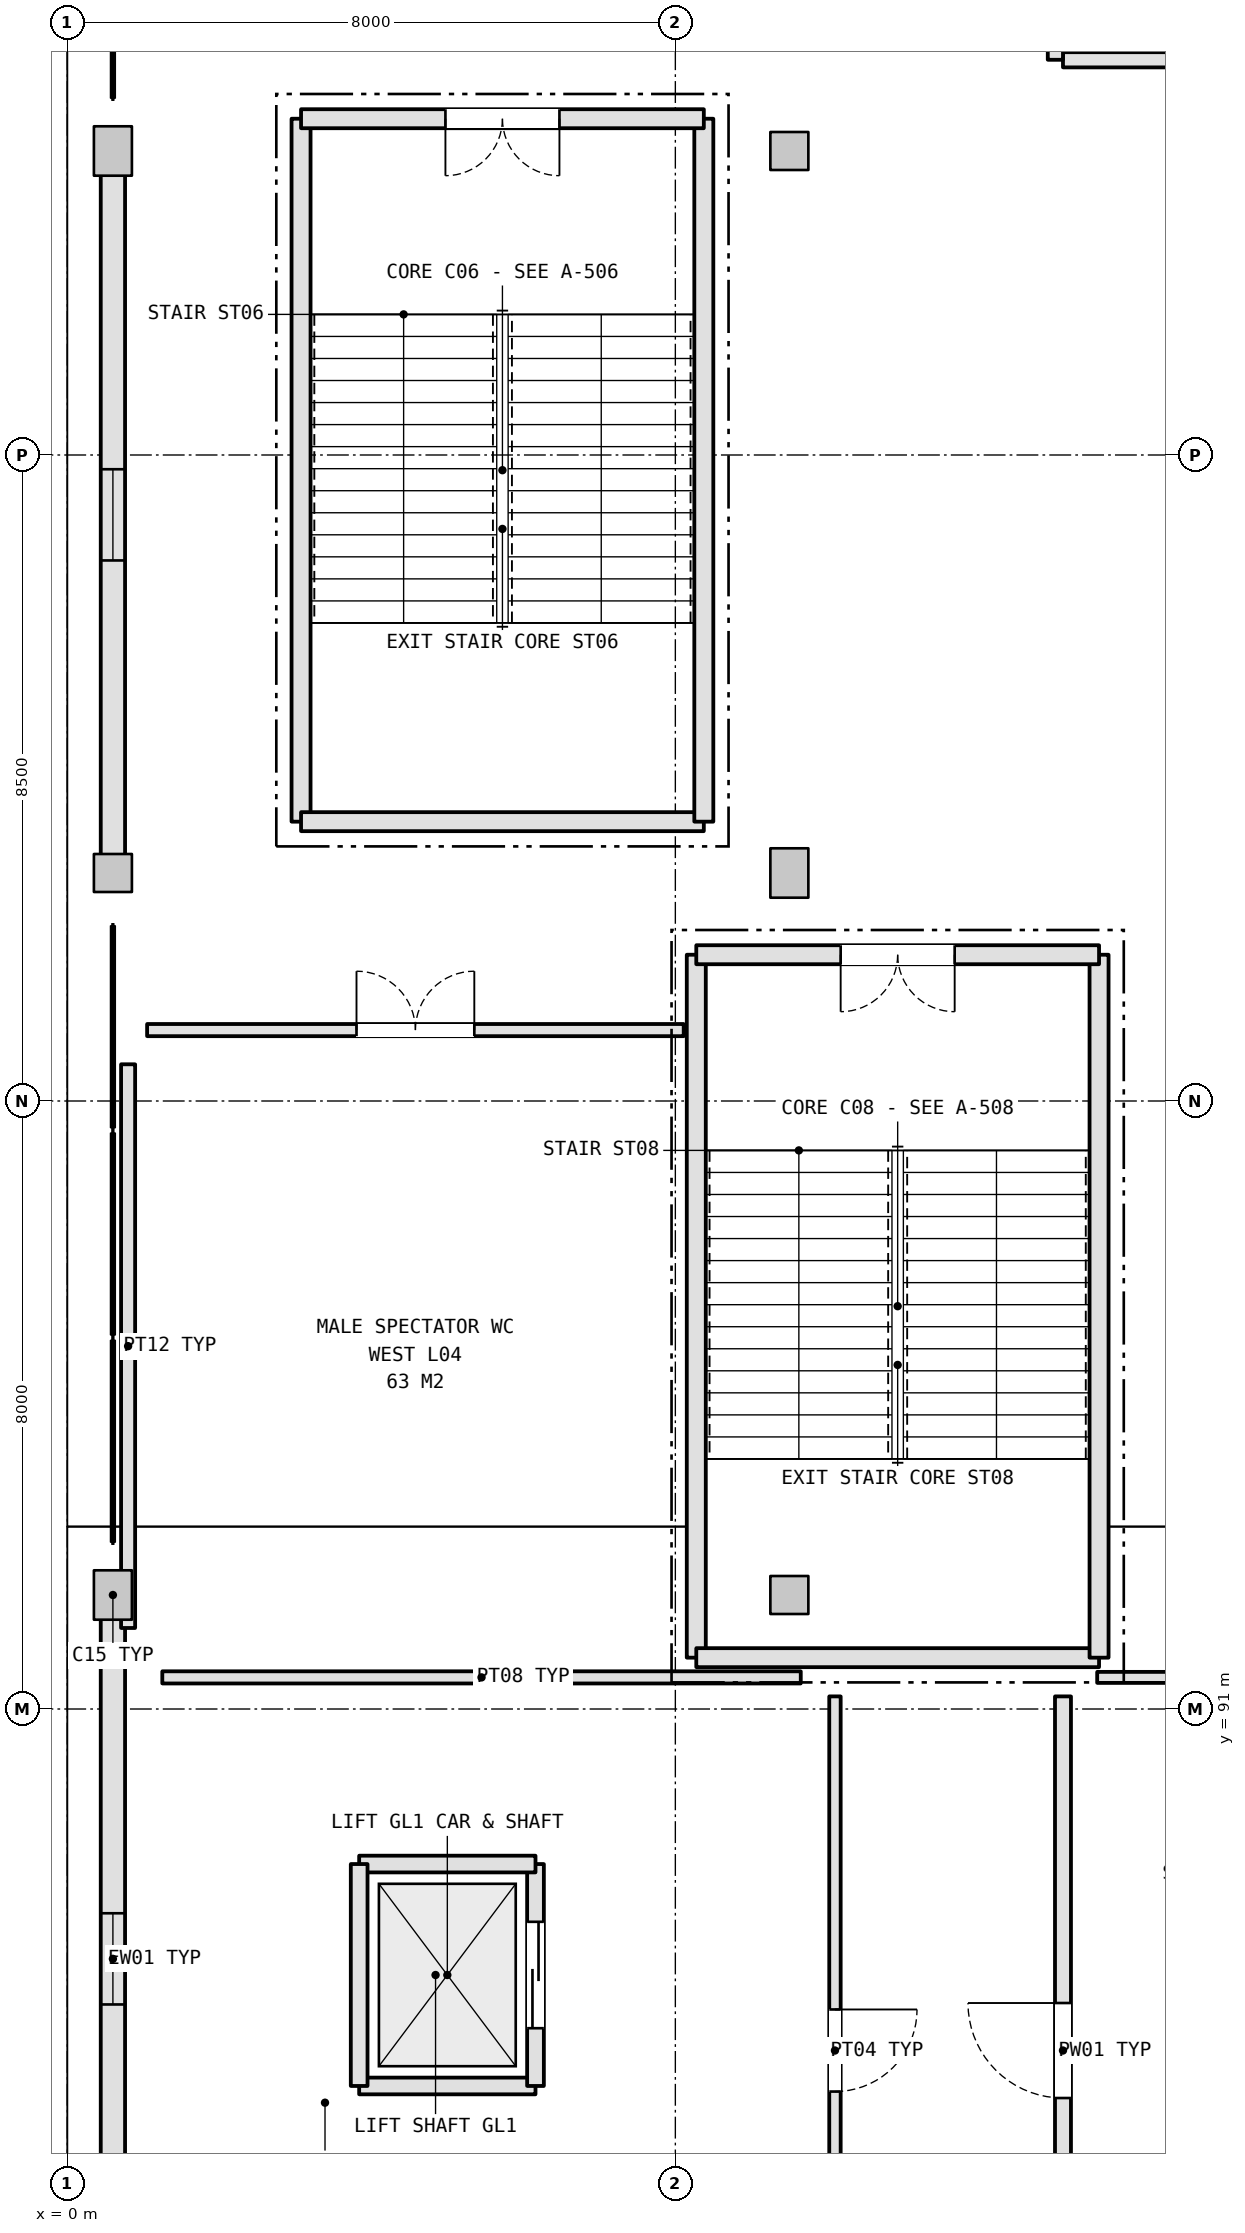
"""IFC4 building model, lengths in metres.
Left out: names, types, materials, properties, quantities, classifications, styles, units other than length and angle.
Written with IfcOpenShell. Run it as: python <this file> out.ifc"""

import sys

from ifc_helpers import new_model, si_unit, direction, frame, frame_2d, origin, origin_2d, place, context, subcontext, project, spatial, rectangle, extrude, element, fill, save


model = new_model("IFC4")
c1 = context("Model", 3, precision=1e-05, world=origin(), true_north=direction((0.0, 1.0)))
c2 = subcontext(c1, "Body", "Model", "MODEL_VIEW")
j1 = project(units=[si_unit("LENGTHUNIT", "METRE"), si_unit("PLANEANGLEUNIT", "RADIAN")], contexts=[c1])
p1 = place(None, origin())
s1 = spatial("IfcSite", under=j1, at=p1, CompositionType="ELEMENT")
p2 = place(p1, origin())
s2 = spatial("IfcBuilding", under=s1, at=p2, CompositionType="ELEMENT")
p3 = place(p2, frame((0.0, 0.0, 21.6)))
s3 = spatial("IfcBuildingStorey", under=s2, at=p3, CompositionType="ELEMENT", Elevation=21.6)
p4 = place(p3, frame((0.6, 92.5, 0.0), z_axis=(0.0, 0.0, 1.0), x_axis=(1.0, 0.0, 0.0)))
e1 = element("IfcColumn", 1, at=p4, inside=s3, PredefinedType="COLUMN", context=c2, shape_type="SweptSolid", body=[
    extrude(rectangle(XDim=0.5, YDim=0.65, at=origin_2d()), origin(), (0.0, 0.0, 1.0), 5.4),
])
p5 = place(p3, frame((0.6, 102.0, 0.0), z_axis=(0.0, 0.0, 1.0), x_axis=(1.0, 0.0, 0.0)))
e2 = element("IfcColumn", 2, at=p5, inside=s3, PredefinedType="COLUMN", context=c2, shape_type="SweptSolid", body=[
    extrude(rectangle(XDim=0.5, YDim=0.5, at=origin_2d()), origin(), (0.0, 0.0, 1.0), 5.4),
])
p6 = place(p3, frame((0.6, 111.5, 0.0), z_axis=(0.0, 0.0, 1.0), x_axis=(1.0, 0.0, 0.0)))
e3 = element("IfcColumn", 3, at=p6, inside=s3, PredefinedType="COLUMN", context=c2, shape_type="SweptSolid", body=[
    extrude(rectangle(XDim=0.5, YDim=0.65, at=origin_2d()), origin(), (0.0, 0.0, 1.0), 5.4),
])
p7 = place(p3, frame((9.5, 92.5, 0.0), z_axis=(0.0, 0.0, 1.0), x_axis=(1.0, 0.0, 0.0)))
e4 = element("IfcColumn", 4, at=p7, inside=s3, PredefinedType="COLUMN", context=c2, shape_type="SweptSolid", body=[
    extrude(rectangle(XDim=0.5, YDim=0.5, at=origin_2d()), origin(), (0.0, 0.0, 1.0), 5.4),
])
p8 = place(p3, frame((9.5, 102.0, 0.0), z_axis=(0.0, 0.0, 1.0), x_axis=(1.0, 0.0, 0.0)))
e5 = element("IfcColumn", 5, at=p8, inside=s3, PredefinedType="COLUMN", context=c2, shape_type="SweptSolid", body=[
    extrude(rectangle(XDim=0.5, YDim=0.65, at=origin_2d()), origin(), (0.0, 0.0, 1.0), 5.4),
])
p9 = place(p3, frame((9.5, 111.5, 0.0), z_axis=(0.0, 0.0, 1.0), x_axis=(1.0, 0.0, 0.0)))
e6 = element("IfcColumn", 6, at=p9, inside=s3, PredefinedType="COLUMN", context=c2, shape_type="SweptSolid", body=[
    extrude(rectangle(XDim=0.5, YDim=0.5, at=origin_2d()), origin(), (0.0, 0.0, 1.0), 5.4),
])
p10 = place(p3, frame((0.6, 83.238, 0.0), z_axis=(0.0, 0.0, 1.0), x_axis=(0.0, 1.0, 0.0)))
e7 = element("IfcWall", 7, at=p10, inside=s3, PredefinedType="SOLIDWALL", context=c2, shape_type="SweptSolid", body=[
    extrude(rectangle(XDim=8.949, YDim=0.32, at=frame_2d((4.475, 0.0))), origin(), (0.0, 0.0, 1.0), 4.485),
])
p11 = place(p10, frame((3.875, 0.0, 1.05)))
e8 = element("IfcOpeningElement", 8, at=p11, cuts=e7, PredefinedType="OPENING", context=c2, shape_type="SweptSolid", body=[
    extrude(rectangle(XDim=1.2, YDim=2.0, at=frame_2d((0.6, 1.0))), frame((0.0, 0.17, 0.0), z_axis=(0.0, -1.0, 0.0), x_axis=(1.0, 0.0, 0.0)), (0.0, 0.0, 1.0), 0.34),
])
p12 = place(p3, frame((0.6, 102.238, 0.0), z_axis=(0.0, 0.0, 1.0), x_axis=(0.0, 1.0, 0.0)))
e9 = element("IfcWall", 9, at=p12, inside=s3, PredefinedType="SOLIDWALL", context=c2, shape_type="SweptSolid", body=[
    extrude(rectangle(XDim=8.949, YDim=0.32, at=frame_2d((4.475, 0.0))), origin(), (0.0, 0.0, 1.0), 4.465),
])
p13 = place(p12, frame((3.875, 0.0, 1.05)))
e10 = element("IfcOpeningElement", 10, at=p13, cuts=e9, PredefinedType="OPENING", context=c2, shape_type="SweptSolid", body=[
    extrude(rectangle(XDim=1.2, YDim=2.0, at=frame_2d((0.6, 1.0))), frame((0.0, 0.17, 0.0), z_axis=(0.0, -1.0, 0.0), x_axis=(1.0, 0.0, 0.0)), (0.0, 0.0, 1.0), 0.34),
])
p14 = place(p3, frame((3.075, 111.925, 0.0), z_axis=(0.0, 0.0, 1.0), x_axis=(0.0, -1.0, 0.0)))
e11 = element("IfcWall", 11, at=p14, inside=s3, PredefinedType="SHEAR", context=c2, shape_type="SweptSolid", body=[
    extrude(rectangle(XDim=9.249, YDim=0.25, at=frame_2d((4.625, 0.0))), origin(), (0.0, 0.0, 1.0), 5.15),
])
p15 = place(p3, frame((3.075, 102.675, 0.0), z_axis=(0.0, 0.0, 1.0), x_axis=(1.0, 0.0, 0.0)))
e12 = element("IfcWall", 12, at=p15, inside=s3, PredefinedType="SHEAR", context=c2, shape_type="SweptSolid", body=[
    extrude(rectangle(XDim=5.299, YDim=0.25, at=frame_2d((2.649, 0.0))), origin(), (0.0, 0.0, 1.0), 5.15),
])
p16 = place(p3, frame((8.375, 102.675, 0.0), z_axis=(0.0, 0.0, 1.0), x_axis=(0.0, 1.0, 0.0)))
e13 = element("IfcWall", 13, at=p16, inside=s3, PredefinedType="SHEAR", context=c2, shape_type="SweptSolid", body=[
    extrude(rectangle(XDim=9.249, YDim=0.25, at=frame_2d((4.625, 0.0))), origin(), (0.0, 0.0, 1.0), 5.15),
])
p17 = place(p3, frame((8.375, 111.925, 0.0), z_axis=(0.0, 0.0, 1.0), x_axis=(-1.0, 0.0, 0.0)))
e14 = element("IfcWall", 14, at=p17, inside=s3, PredefinedType="SHEAR", context=c2, shape_type="SweptSolid", body=[
    extrude(rectangle(XDim=5.299, YDim=0.25, at=frame_2d((2.649, 0.0))), origin(), (0.0, 0.0, 1.0), 5.15),
])
p18 = place(p17, frame((1.9, 0.0, 0.0)))
e15 = element("IfcOpeningElement", 15, at=p18, cuts=e14, PredefinedType="OPENING", context=c2, shape_type="SweptSolid", body=[
    extrude(rectangle(XDim=1.5, YDim=2.2, at=frame_2d((0.75, 1.1))), frame((0.0, 0.135, 0.0), z_axis=(0.0, -1.0, 0.0), x_axis=(1.0, 0.0, 0.0)), (0.0, 0.0, 1.0), 0.27),
])
p19 = place(p3, frame((8.275, 100.925, 0.0), z_axis=(0.0, 0.0, 1.0), x_axis=(0.0, -1.0, 0.0)))
e16 = element("IfcWall", 16, at=p19, inside=s3, PredefinedType="SHEAR", context=c2, shape_type="SweptSolid", body=[
    extrude(rectangle(XDim=9.249, YDim=0.25, at=frame_2d((4.625, 0.0))), origin(), (0.0, 0.0, 1.0), 5.15),
])
p20 = place(p3, frame((8.275, 91.675, 0.0), z_axis=(0.0, 0.0, 1.0), x_axis=(1.0, 0.0, 0.0)))
e17 = element("IfcWall", 17, at=p20, inside=s3, PredefinedType="SHEAR", context=c2, shape_type="SweptSolid", body=[
    extrude(rectangle(XDim=5.299, YDim=0.25, at=frame_2d((2.65, 0.0))), origin(), (0.0, 0.0, 1.0), 5.15),
])
p21 = place(p3, frame((13.575, 91.675, 0.0), z_axis=(0.0, 0.0, 1.0), x_axis=(0.0, 1.0, 0.0)))
e18 = element("IfcWall", 18, at=p21, inside=s3, PredefinedType="SHEAR", context=c2, shape_type="SweptSolid", body=[
    extrude(rectangle(XDim=9.249, YDim=0.25, at=frame_2d((4.625, 0.0))), origin(), (0.0, 0.0, 1.0), 5.15),
])
p22 = place(p3, frame((13.575, 100.925, 0.0), z_axis=(0.0, 0.0, 1.0), x_axis=(-1.0, 0.0, 0.0)))
e19 = element("IfcWall", 19, at=p22, inside=s3, PredefinedType="SHEAR", context=c2, shape_type="SweptSolid", body=[
    extrude(rectangle(XDim=5.299, YDim=0.25, at=frame_2d((2.65, 0.0))), origin(), (0.0, 0.0, 1.0), 5.15),
])
p23 = place(p22, frame((1.9, 0.0, 0.0)))
e20 = element("IfcOpeningElement", 20, at=p23, cuts=e19, PredefinedType="OPENING", context=c2, shape_type="SweptSolid", body=[
    extrude(rectangle(XDim=1.5, YDim=2.2, at=frame_2d((0.75, 1.1))), frame((0.0, 0.135, 0.0), z_axis=(0.0, -1.0, 0.0), x_axis=(1.0, 0.0, 0.0)), (0.0, 0.0, 1.0), 0.27),
])
p24 = place(p3, frame((13.1, 112.7, 0.0), z_axis=(0.0, 0.0, 1.0), x_axis=(1.0, 0.0, 0.0)))
e21 = element("IfcWall", 21, at=p24, inside=s3, PredefinedType="SOLIDWALL", context=c2, shape_type="SweptSolid", body=[
    extrude(rectangle(XDim=3.4, YDim=0.2, at=frame_2d((1.7, 0.0))), origin(), (0.0, 0.0, 1.0), 5.12),
])
p25 = place(p3, frame((13.0, 119.3, 0.0), z_axis=(0.0, 0.0, 1.0), x_axis=(0.0, -1.0, 0.0)))
e22 = element("IfcWall", 22, at=p25, inside=s3, PredefinedType="SOLIDWALL", context=c2, shape_type="SweptSolid", body=[
    extrude(rectangle(XDim=6.6, YDim=0.2, at=frame_2d((3.3, 0.0))), origin(), (0.0, 0.0, 1.0), 5.12),
])
p26 = place(p25, frame((2.7, 0.0, 0.0)))
e23 = element("IfcOpeningElement", 23, at=p26, cuts=e22, PredefinedType="OPENING", context=c2, shape_type="SweptSolid", body=[
    extrude(rectangle(XDim=1.2, YDim=2.2, at=frame_2d((0.6, 1.1))), frame((0.0, 0.11, 0.0), z_axis=(0.0, -1.0, 0.0), x_axis=(1.0, 0.0, 0.0)), (0.0, 0.0, 1.0), 0.22),
])
p27 = place(p3, frame((3.84, 86.04, 0.0), z_axis=(0.0, 0.0, 1.0), x_axis=(1.0, 0.0, 0.0)))
e24 = element("IfcWall", 24, at=p27, inside=s3, PredefinedType="SHEAR", context=c2, shape_type="SweptSolid", body=[
    extrude(rectangle(XDim=2.32, YDim=0.22, at=frame_2d((1.16, 0.0))), origin(), (0.0, 0.0, 1.0), 5.15),
])
p28 = place(p3, frame((6.16, 86.04, 0.0), z_axis=(0.0, 0.0, 1.0), x_axis=(0.0, 1.0, 0.0)))
e25 = element("IfcWall", 25, at=p28, inside=s3, PredefinedType="SHEAR", context=c2, shape_type="SweptSolid", body=[
    extrude(rectangle(XDim=2.92, YDim=0.22, at=frame_2d((1.46, 0.0))), origin(), (0.0, 0.0, 1.0), 5.15),
])
p29 = place(p28, frame((0.76, 0.0, 0.0)))
e26 = element("IfcOpeningElement", 26, at=p29, cuts=e25, PredefinedType="OPENING", context=c2, shape_type="SweptSolid", body=[
    extrude(rectangle(XDim=1.4, YDim=2.3, at=frame_2d((0.7, 1.15))), frame((0.0, 0.12, 0.0), z_axis=(0.0, -1.0, 0.0), x_axis=(1.0, 0.0, 0.0)), (0.0, 0.0, 1.0), 0.24),
])
p30 = place(p3, frame((6.16, 88.96, 0.0), z_axis=(0.0, 0.0, 1.0), x_axis=(-1.0, 0.0, 0.0)))
e27 = element("IfcWall", 27, at=p30, inside=s3, PredefinedType="SHEAR", context=c2, shape_type="SweptSolid", body=[
    extrude(rectangle(XDim=2.32, YDim=0.22, at=frame_2d((1.16, 0.0))), origin(), (0.0, 0.0, 1.0), 5.15),
])
p31 = place(p3, frame((3.84, 88.96, 0.0), z_axis=(0.0, 0.0, 1.0), x_axis=(0.0, -1.0, 0.0)))
e28 = element("IfcWall", 28, at=p31, inside=s3, PredefinedType="SHEAR", context=c2, shape_type="SweptSolid", body=[
    extrude(rectangle(XDim=2.92, YDim=0.22, at=frame_2d((1.46, 0.0))), origin(), (0.0, 0.0, 1.0), 5.15),
])
p32 = place(p3, frame((10.1, 91.166, 0.0), z_axis=(0.0, 0.0, 1.0), x_axis=(0.0, -1.0, 0.0)))
e29 = element("IfcWall", 29, at=p32, inside=s3, PredefinedType="PARTITIONING", context=c2, shape_type="SweptSolid", body=[
    extrude(rectangle(XDim=9.319, YDim=0.15, at=frame_2d((4.66, 0.0))), origin(), (0.0, 0.0, 1.0), 4.666),
])
p33 = place(p32, frame((4.119, 0.0, 0.0)))
e30 = element("IfcOpeningElement", 30, at=p33, cuts=e29, PredefinedType="OPENING", context=c2, shape_type="SweptSolid", body=[
    extrude(rectangle(XDim=1.08, YDim=2.25, at=frame_2d((0.54, 1.125))), frame((0.0, 0.085, 0.0), z_axis=(0.0, -1.0, 0.0), x_axis=(1.0, 0.0, 0.0)), (0.0, 0.0, 1.0), 0.17),
])
p34 = place(p3, frame((1.25, 91.416, 0.0), z_axis=(0.0, 0.0, 1.0), x_axis=(1.0, 0.0, 0.0)))
e31 = element("IfcWall", 31, at=p34, inside=s3, PredefinedType="PARTITIONING", context=c2, shape_type="SweptSolid", body=[
    extrude(rectangle(XDim=8.4, YDim=0.16, at=frame_2d((4.2, 0.0))), origin(), (0.0, 0.0, 1.0), 5.12),
])
p35 = place(p3, frame((13.1, 81.847, 0.0), z_axis=(0.0, 0.0, 1.0), x_axis=(0.0, 1.0, 0.0)))
e32 = element("IfcWall", 32, at=p35, inside=s3, PredefinedType="PLUMBINGWALL", context=c2, shape_type="SweptSolid", body=[
    extrude(rectangle(XDim=9.319, YDim=0.21, at=frame_2d((4.66, 0.0))), origin(), (0.0, 0.0, 1.0), 4.666),
])
p36 = place(p35, frame((4.034, 0.0, 0.0)))
e33 = element("IfcOpeningElement", 33, at=p36, cuts=e32, PredefinedType="OPENING", context=c2, shape_type="SweptSolid", body=[
    extrude(rectangle(XDim=1.25, YDim=2.2, at=frame_2d((0.625, 1.1))), frame((0.0, 0.115, 0.0), z_axis=(0.0, -1.0, 0.0), x_axis=(1.0, 0.0, 0.0)), (0.0, 0.0, 1.0), 0.23),
])
p37 = place(p3, frame((13.55, 91.416, 0.0), z_axis=(0.0, 0.0, 1.0), x_axis=(1.0, 0.0, 0.0)))
e34 = element("IfcWall", 34, at=p37, inside=s3, PredefinedType="PARTITIONING", context=c2, shape_type="SweptSolid", body=[
    extrude(rectangle(XDim=4.2, YDim=0.145, at=frame_2d((2.1, 0.0))), origin(), (0.0, 0.0, 1.0), 5.12),
])
p38 = place(p3, frame((1.05, 99.933, 0.0), z_axis=(0.0, 0.0, 1.0), x_axis=(1.0, 0.0, 0.0)))
e35 = element("IfcWall", 35, at=p38, inside=s3, PredefinedType="PARTITIONING", context=c2, shape_type="SweptSolid", body=[
    extrude(rectangle(XDim=7.06, YDim=0.16, at=frame_2d((3.53, 0.0))), origin(), (0.0, 0.0, 1.0), 5.12),
])
p39 = place(p38, frame((2.755, 0.0, 0.0)))
e36 = element("IfcOpeningElement", 36, at=p39, cuts=e35, PredefinedType="OPENING", context=c2, shape_type="SweptSolid", body=[
    extrude(rectangle(XDim=1.55, YDim=2.15, at=frame_2d((0.775, 1.075))), frame((0.0, 0.09, 0.0), z_axis=(0.0, -1.0, 0.0), x_axis=(1.0, 0.0, 0.0)), (0.0, 0.0, 1.0), 0.18),
])
p40 = place(p3, frame((0.8, 92.066, 0.0), z_axis=(0.0, 0.0, 1.0), x_axis=(0.0, 1.0, 0.0)))
e37 = element("IfcWall", 37, at=p40, inside=s3, PredefinedType="PARTITIONING", context=c2, shape_type="SweptSolid", body=[
    extrude(rectangle(XDim=7.417, YDim=0.185, at=frame_2d((3.708, 0.0))), origin(), (0.0, 0.0, 1.0), 4.485),
])
p41 = place(p11, origin())
e38 = element("IfcWindow", 38, at=p41, inside=s3, PartitioningType="SINGLE_PANEL", PredefinedType="WINDOW", context=c2, shape_type="SweptSolid", body=[
    extrude(rectangle(XDim=1.2, YDim=2.0, at=frame_2d((0.6, 1.0))), frame((0.0, 0.03, 0.0), z_axis=(0.0, -1.0, 0.0), x_axis=(1.0, 0.0, 0.0)), (0.0, 0.0, 1.0), 0.06),
])
fill(e8, e38)
p42 = place(p13, origin())
e39 = element("IfcWindow", 39, at=p42, inside=s3, PartitioningType="SINGLE_PANEL", PredefinedType="WINDOW", context=c2, shape_type="SweptSolid", body=[
    extrude(rectangle(XDim=1.2, YDim=2.0, at=frame_2d((0.6, 1.0))), frame((0.0, 0.03, 0.0), z_axis=(0.0, -1.0, 0.0), x_axis=(1.0, 0.0, 0.0)), (0.0, 0.0, 1.0), 0.06),
])
fill(e10, e39)
p43 = place(p18, origin())
e40 = element("IfcDoor", 40, at=p43, inside=s3, OperationType="DOUBLE_DOOR_SINGLE_SWING", PredefinedType="DOOR", context=c2, shape_type="SweptSolid", body=[
    extrude(rectangle(XDim=1.5, YDim=2.2, at=frame_2d((0.75, 1.1))), frame((0.0, 0.025, 0.0), z_axis=(0.0, -1.0, 0.0), x_axis=(1.0, 0.0, 0.0)), (0.0, 0.0, 1.0), 0.05),
])
fill(e15, e40)
p44 = place(p23, origin())
e41 = element("IfcDoor", 41, at=p44, inside=s3, OperationType="DOUBLE_DOOR_SINGLE_SWING", PredefinedType="DOOR", context=c2, shape_type="SweptSolid", body=[
    extrude(rectangle(XDim=1.5, YDim=2.2, at=frame_2d((0.75, 1.1))), frame((0.0, 0.025, 0.0), z_axis=(0.0, -1.0, 0.0), x_axis=(1.0, 0.0, 0.0)), (0.0, 0.0, 1.0), 0.05),
])
fill(e20, e41)
p45 = place(p29, origin())
e42 = element("IfcDoor", 42, at=p45, inside=s3, OperationType="DOUBLE_DOOR_SLIDING", PredefinedType="DOOR", context=c2, shape_type="SweptSolid", body=[
    extrude(rectangle(XDim=1.4, YDim=2.3, at=frame_2d((0.7, 1.15))), frame((0.0, 0.025, 0.0), z_axis=(0.0, -1.0, 0.0), x_axis=(1.0, 0.0, 0.0)), (0.0, 0.0, 1.0), 0.05),
])
fill(e26, e42)
p46 = place(p33, origin())
e43 = element("IfcDoor", 43, at=p46, inside=s3, OperationType="SINGLE_SWING_LEFT", PredefinedType="DOOR", context=c2, shape_type="SweptSolid", body=[
    extrude(rectangle(XDim=1.08, YDim=2.25, at=frame_2d((0.54, 1.125))), frame((0.0, 0.025, 0.0), z_axis=(0.0, -1.0, 0.0), x_axis=(1.0, 0.0, 0.0)), (0.0, 0.0, 1.0), 0.05),
])
fill(e30, e43)
p47 = place(p36, origin())
e44 = element("IfcDoor", 44, at=p47, inside=s3, OperationType="SINGLE_SWING_RIGHT", PredefinedType="DOOR", context=c2, shape_type="SweptSolid", body=[
    extrude(rectangle(XDim=1.25, YDim=2.2, at=frame_2d((0.625, 1.1))), frame((0.0, 0.025, 0.0), z_axis=(0.0, -1.0, 0.0), x_axis=(1.0, 0.0, 0.0)), (0.0, 0.0, 1.0), 0.05),
])
fill(e33, e44)
p48 = place(p39, origin())
e45 = element("IfcDoor", 45, at=p48, inside=s3, OperationType="DOUBLE_DOOR_SINGLE_SWING", PredefinedType="DOOR", context=c2, shape_type="SweptSolid", body=[
    extrude(rectangle(XDim=1.55, YDim=2.15, at=frame_2d((0.775, 1.075))), frame((0.0, 0.025, 0.0), z_axis=(0.0, -1.0, 0.0), x_axis=(1.0, 0.0, 0.0)), (0.0, 0.0, 1.0), 0.05),
])
fill(e36, e45)
save(model, sys.argv[1])
